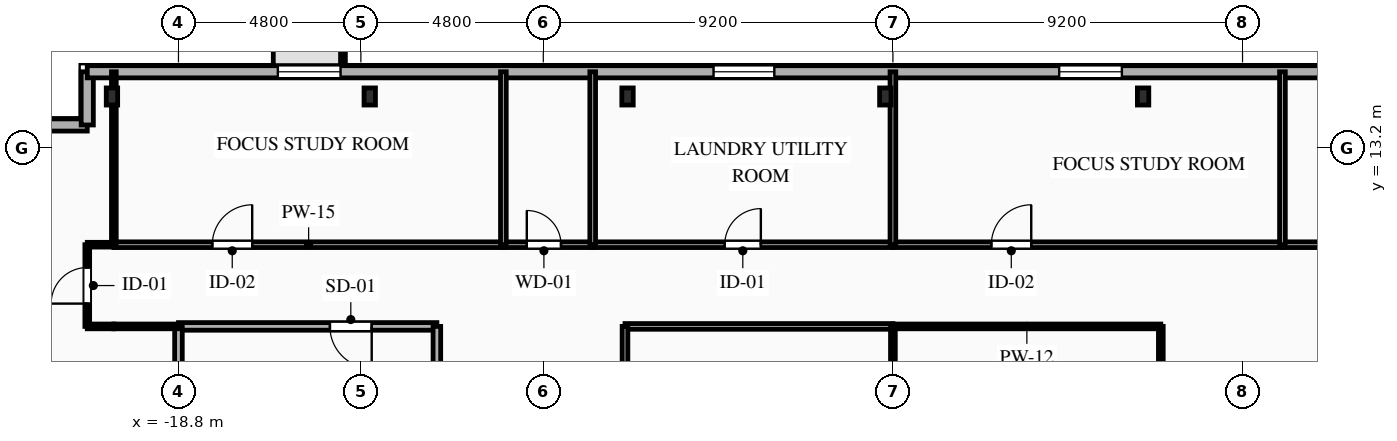
"""IFC4 building model, lengths in metres.
Left out: names, types, materials, properties, quantities, classifications, styles, units other than length and angle.
Written with IfcOpenShell. Run it as: python <this file> out.ifc"""

import sys

from ifc_helpers import new_model, si_unit, direction, frame, frame_2d, origin, origin_2d, place, context, subcontext, project, spatial, rectangle, i_section, extrude, element, fill, save


model = new_model("IFC4")
c1 = context("Model", 3, precision=1e-05, world=origin(), true_north=direction((0.0, 1.0)))
c2 = subcontext(c1, "Body", "Model", "MODEL_VIEW")
j1 = project(units=[si_unit("LENGTHUNIT", "METRE"), si_unit("PLANEANGLEUNIT", "RADIAN")], contexts=[c1])
p1 = place(None, origin())
s1 = spatial("IfcSite", under=j1, at=p1, CompositionType="ELEMENT")
p2 = place(p1, origin())
s2 = spatial("IfcBuilding", under=s1, at=p2, CompositionType="ELEMENT")
p3 = place(p2, frame((0.0, 0.0, 231.65)))
s3 = spatial("IfcBuildingStorey", under=s2, at=p3, CompositionType="ELEMENT", Elevation=231.65)
for number, where, z_axis, x_axis in (
    (1, (6.583, 14.55, 0.0), (0.0, 0.0, 1.0), (1.0, 0.0, 0.0)),
    (2, (-0.2, 14.55, 0.0), (0.0, 0.0, 1.0), (1.0, 0.0, 0.0)),
    (3, (-6.983, 14.55, 0.0), (0.0, 0.0, 1.0), (1.0, 0.0, 0.0)),
    (4, (-13.767, 14.55, 0.0), (0.0, 0.0, 1.0), (1.0, 0.0, 0.0)),
    (5, (-20.55, 14.55, 0.0), (0.0, 0.0, 1.0), (1.0, 0.0, 0.0)),
):
    element("IfcColumn", number, at=place(p3, frame(where, z_axis=z_axis, x_axis=x_axis)), inside=s3, PredefinedType="COLUMN", context=c2, shape_type="SweptSolid", body=[
        extrude(i_section(OverallWidth=0.3, OverallDepth=0.45, WebThickness=0.014, FlangeThickness=0.026, FilletRadius=0.027, at=origin_2d()), origin(), (0.0, 0.0, 1.0), 3.35),
    ])
p4 = place(p3, frame((-22.6, 13.8, 0.0), z_axis=(0.0, 0.0, 1.0), x_axis=(1.0, 0.0, 0.0)))
e6 = element("IfcWall", 6, at=p4, inside=s3, PredefinedType="SOLIDWALL", context=c2, shape_type="SweptSolid", body=[
    extrude(rectangle(XDim=1.4, YDim=0.32, at=frame_2d((0.7, 0.0))), origin(), (0.0, 0.0, 1.0), 3.04),
])
p5 = place(p3, frame((-21.2, 13.8, 0.0), z_axis=(0.0, 0.0, 1.0), x_axis=(0.0, 1.0, 0.0)))
e7 = element("IfcWall", 7, at=p5, inside=s3, PredefinedType="SOLIDWALL", context=c2, shape_type="SweptSolid", body=[
    extrude(rectangle(XDim=1.4, YDim=0.32, at=frame_2d((0.7, 0.0))), origin(), (0.0, 0.0, 1.0), 3.04),
])
p6 = place(p3, frame((-21.2, 15.2, 0.0), z_axis=(0.0, 0.0, 1.0), x_axis=(1.0, 0.0, 0.0)))
e8 = element("IfcWall", 8, at=p6, inside=s3, PredefinedType="SOLIDWALL", context=c2, shape_type="SweptSolid", body=[
    extrude(rectangle(XDim=42.0, YDim=0.32, at=frame_2d((21.0, 0.0))), origin(), (0.0, 0.0, 1.0), 3.04),
])
p7 = place(p6, frame((5.015, 0.0, 0.85)))
e9 = element("IfcOpeningElement", 9, at=p7, cuts=e8, PredefinedType="OPENING", context=c2, shape_type="SweptSolid", body=[
    extrude(rectangle(XDim=1.65, YDim=1.85, at=frame_2d((0.825, 0.925))), frame((0.0, 0.17, 0.0), z_axis=(0.0, -1.0, 0.0), x_axis=(1.0, 0.0, 0.0)), (0.0, 0.0, 1.0), 0.34),
])
p8 = place(p6, frame((16.48, 0.0, 0.85)))
e10 = element("IfcOpeningElement", 10, at=p8, cuts=e8, PredefinedType="OPENING", context=c2, shape_type="SweptSolid", body=[
    extrude(rectangle(XDim=1.6, YDim=1.85, at=frame_2d((0.8, 0.925))), frame((0.0, 0.17, 0.0), z_axis=(0.0, -1.0, 0.0), x_axis=(1.0, 0.0, 0.0)), (0.0, 0.0, 1.0), 0.34),
])
p9 = place(p6, frame((25.575, 0.0, 0.85)))
e11 = element("IfcOpeningElement", 11, at=p9, cuts=e8, PredefinedType="OPENING", context=c2, shape_type="SweptSolid", body=[
    extrude(rectangle(XDim=1.65, YDim=1.85, at=frame_2d((0.825, 0.925))), frame((0.0, 0.17, 0.0), z_axis=(0.0, -1.0, 0.0), x_axis=(1.0, 0.0, 0.0)), (0.0, 0.0, 1.0), 0.34),
])
p10 = place(p6, frame((35.735, 0.0, 0.85)))
e12 = element("IfcOpeningElement", 12, at=p10, cuts=e8, PredefinedType="OPENING", context=c2, shape_type="SweptSolid", body=[
    extrude(rectangle(XDim=1.65, YDim=1.85, at=frame_2d((0.825, 0.925))), frame((0.0, 0.17, 0.0), z_axis=(0.0, -1.0, 0.0), x_axis=(1.0, 0.0, 0.0)), (0.0, 0.0, 1.0), 0.34),
])
p11 = place(p3, frame((-12.0, 8.5, 0.0), z_axis=(0.0, 0.0, 1.0), x_axis=(-1.0, 0.0, 0.0)))
e13 = element("IfcWall", 13, at=p11, inside=s3, PredefinedType="PARTITIONING", context=c2, shape_type="SweptSolid", body=[
    extrude(rectangle(XDim=6.8, YDim=0.2, at=frame_2d((3.4, 0.0))), origin(), (0.0, 0.0, 1.0), 3.04),
])
p12 = place(p11, frame((1.715, 0.0, 0.0)))
e14 = element("IfcOpeningElement", 14, at=p12, cuts=e13, PredefinedType="OPENING", context=c2, shape_type="SweptSolid", body=[
    extrude(rectangle(XDim=1.1, YDim=2.15, at=frame_2d((0.55, 1.075))), frame((0.0, 0.11, 0.0), z_axis=(0.0, -1.0, 0.0), x_axis=(1.0, 0.0, 0.0)), (0.0, 0.0, 1.0), 0.22),
])
p13 = place(p3, frame((-12.0, 5.6, 0.0), z_axis=(0.0, 0.0, 1.0), x_axis=(0.0, 1.0, 0.0)))
e15 = element("IfcWall", 15, at=p13, inside=s3, PredefinedType="PARTITIONING", context=c2, shape_type="SweptSolid", body=[
    extrude(rectangle(XDim=2.9, YDim=0.2, at=frame_2d((1.45, 0.0))), origin(), (0.0, 0.0, 1.0), 3.04),
])
p14 = place(p3, frame((-18.8, 8.5, 0.0), z_axis=(0.0, 0.0, 1.0), x_axis=(0.0, -1.0, 0.0)))
e16 = element("IfcWall", 16, at=p14, inside=s3, PredefinedType="PARTITIONING", context=c2, shape_type="SweptSolid", body=[
    extrude(rectangle(XDim=2.9, YDim=0.2, at=frame_2d((1.45, 0.0))), origin(), (0.0, 0.0, 1.0), 2.665),
])
p15 = place(p3, frame((-21.2, 8.5, 0.0), z_axis=(0.0, 0.0, 1.0), x_axis=(0.0, 1.0, 0.0)))
e17 = element("IfcWall", 17, at=p15, inside=s3, PredefinedType="PARTITIONING", context=c2, shape_type="SweptSolid", body=[
    extrude(rectangle(XDim=2.15, YDim=0.125, at=frame_2d((1.075, 0.0))), origin(), (0.0, 0.0, 1.0), 2.695),
])
p16 = place(p15, frame((0.6, 0.0, 0.0)))
e18 = element("IfcOpeningElement", 18, at=p16, cuts=e17, PredefinedType="OPENING", context=c2, shape_type="SweptSolid", body=[
    extrude(rectangle(XDim=0.95, YDim=2.1, at=frame_2d((0.475, 1.05))), frame((0.0, 0.073, 0.0), z_axis=(0.0, -1.0, 0.0), x_axis=(1.0, 0.0, 0.0)), (0.0, 0.0, 1.0), 0.145),
])
p17 = place(p3, frame((-18.8, 8.5, 0.0), z_axis=(0.0, 0.0, 1.0), x_axis=(-1.0, 0.0, 0.0)))
e19 = element("IfcWall", 19, at=p17, inside=s3, PredefinedType="PARTITIONING", context=c2, shape_type="SweptSolid", body=[
    extrude(rectangle(XDim=1.7, YDim=0.125, at=frame_2d((0.85, 0.0))), origin(), (0.0, 0.0, 1.0), 3.04),
])
for number, where, z_axis, x_axis in (
    (20, (-20.5, 8.5, 0.0), (0.0, 0.0, 1.0), (-1.0, 0.0, 0.0)),
    (21, (-21.2, 10.65, 0.0), (0.0, 0.0, 1.0), (1.0, 0.0, 0.0)),
):
    element("IfcWall", number, at=place(p3, frame(where, z_axis=z_axis, x_axis=x_axis)), inside=s3, PredefinedType="PARTITIONING", context=c2, shape_type="SweptSolid", body=[
        extrude(rectangle(XDim=0.7, YDim=0.125, at=frame_2d((0.35, 0.0))), origin(), (0.0, 0.0, 1.0), 3.04),
    ])
p18 = place(p3, frame((-20.5, 10.65, 0.0), z_axis=(0.0, 0.0, 1.0), x_axis=(1.0, 0.0, 0.0)))
e22 = element("IfcWall", 22, at=p18, inside=s3, PredefinedType="PARTITIONING", context=c2, shape_type="SweptSolid", body=[
    extrude(rectangle(XDim=10.25, YDim=0.15, at=frame_2d((5.125, 0.0))), origin(), (0.0, 0.0, 1.0), 3.04),
])
p19 = place(p18, frame((2.59, 0.0, 0.0)))
e23 = element("IfcOpeningElement", 23, at=p19, cuts=e22, PredefinedType="OPENING", context=c2, shape_type="SweptSolid", body=[
    extrude(rectangle(XDim=1.05, YDim=2.15, at=frame_2d((0.525, 1.075))), frame((0.0, 0.085, 0.0), z_axis=(0.0, -1.0, 0.0), x_axis=(1.0, 0.0, 0.0)), (0.0, 0.0, 1.0), 0.17),
])
p20 = place(p3, frame((-10.25, 10.65, 0.0), z_axis=(0.0, 0.0, 1.0), x_axis=(1.0, 0.0, 0.0)))
e24 = element("IfcWall", 24, at=p20, inside=s3, PredefinedType="PLUMBINGWALL", context=c2, shape_type="SweptSolid", body=[
    extrude(rectangle(XDim=2.35, YDim=0.15, at=frame_2d((1.175, 0.0))), origin(), (0.0, 0.0, 1.0), 3.04),
])
p21 = place(p20, frame((0.616, 0.0, 0.0)))
e25 = element("IfcOpeningElement", 25, at=p21, cuts=e24, PredefinedType="OPENING", context=c2, shape_type="SweptSolid", body=[
    extrude(rectangle(XDim=0.9, YDim=2.1, at=frame_2d((0.45, 1.05))), frame((0.0, 0.085, 0.0), z_axis=(0.0, -1.0, 0.0), x_axis=(1.0, 0.0, 0.0)), (0.0, 0.0, 1.0), 0.17),
])
p22 = place(p3, frame((-7.9, 10.65, 0.0), z_axis=(0.0, 0.0, 1.0), x_axis=(1.0, 0.0, 0.0)))
e26 = element("IfcWall", 26, at=p22, inside=s3, PredefinedType="PARTITIONING", context=c2, shape_type="SweptSolid", body=[
    extrude(rectangle(XDim=7.9, YDim=0.15, at=frame_2d((3.95, 0.0))), origin(), (0.0, 0.0, 1.0), 3.04),
])
p23 = place(p22, frame((3.475, 0.0, 0.0)))
e27 = element("IfcOpeningElement", 27, at=p23, cuts=e26, PredefinedType="OPENING", context=c2, shape_type="SweptSolid", body=[
    extrude(rectangle(XDim=0.95, YDim=2.1, at=frame_2d((0.475, 1.05))), frame((0.0, 0.085, 0.0), z_axis=(0.0, -1.0, 0.0), x_axis=(1.0, 0.0, 0.0)), (0.0, 0.0, 1.0), 0.17),
])
p24 = place(p3, frame((0.0, 8.5, 0.0), z_axis=(0.0, 0.0, 1.0), x_axis=(-1.0, 0.0, 0.0)))
e28 = element("IfcWall", 28, at=p24, inside=s3, PredefinedType="PARTITIONING", context=c2, shape_type="SweptSolid", body=[
    extrude(rectangle(XDim=7.05, YDim=0.15, at=frame_2d((3.525, 0.0))), origin(), (0.0, 0.0, 1.0), 3.04),
])
p25 = place(p3, frame((0.0, 10.65, 0.0), z_axis=(0.0, 0.0, 1.0), x_axis=(1.0, 0.0, 0.0)))
e29 = element("IfcWall", 29, at=p25, inside=s3, PredefinedType="PARTITIONING", context=c2, shape_type="SweptSolid", body=[
    extrude(rectangle(XDim=10.25, YDim=0.15, at=frame_2d((5.125, 0.0))), origin(), (0.0, 0.0, 1.0), 3.04),
])
p26 = place(p25, frame((2.59, 0.0, 0.0)))
e30 = element("IfcOpeningElement", 30, at=p26, cuts=e29, PredefinedType="OPENING", context=c2, shape_type="SweptSolid", body=[
    extrude(rectangle(XDim=1.05, YDim=2.15, at=frame_2d((0.525, 1.075))), frame((0.0, 0.085, 0.0), z_axis=(0.0, -1.0, 0.0), x_axis=(1.0, 0.0, 0.0)), (0.0, 0.0, 1.0), 0.17),
])
p27 = place(p3, frame((10.25, 10.65, 0.0), z_axis=(0.0, 0.0, 1.0), x_axis=(1.0, 0.0, 0.0)))
e31 = element("IfcWall", 31, at=p27, inside=s3, PredefinedType="PARTITIONING", context=c2, shape_type="SweptSolid", body=[
    extrude(rectangle(XDim=10.25, YDim=0.15, at=frame_2d((5.125, 0.0))), origin(), (0.0, 0.0, 1.0), 3.04),
])
p28 = place(p27, frame((5.605, 0.0, 0.0)))
e32 = element("IfcOpeningElement", 32, at=p28, cuts=e31, PredefinedType="OPENING", context=c2, shape_type="SweptSolid", body=[
    extrude(rectangle(XDim=1.05, YDim=2.15, at=frame_2d((0.525, 1.075))), frame((0.0, 0.085, 0.0), z_axis=(0.0, -1.0, 0.0), x_axis=(1.0, 0.0, 0.0)), (0.0, 0.0, 1.0), 0.17),
])
p29 = place(p3, frame((7.05, 8.5, 0.0), z_axis=(0.0, 0.0, 1.0), x_axis=(-1.0, 0.0, 0.0)))
e33 = element("IfcWall", 33, at=p29, inside=s3, PredefinedType="PARTITIONING", context=c2, shape_type="SweptSolid", body=[
    extrude(rectangle(XDim=7.05, YDim=0.125, at=frame_2d((3.525, 0.0))), origin(), (0.0, 0.0, 1.0), 3.04),
])
p30 = place(p3, frame((-7.05, 8.5, 0.0), z_axis=(0.0, 0.0, 1.0), x_axis=(0.0, -1.0, 0.0)))
e34 = element("IfcWall", 34, at=p30, inside=s3, PredefinedType="PARTITIONING", context=c2, shape_type="SweptSolid", body=[
    extrude(rectangle(XDim=14.1, YDim=0.15, at=frame_2d((7.05, 0.0))), origin(), (0.0, 0.0, 1.0), 3.04),
])
p31 = place(p30, frame((8.074, 0.0, 0.0)))
e35 = element("IfcOpeningElement", 35, at=p31, cuts=e34, PredefinedType="OPENING", context=c2, shape_type="SweptSolid", body=[
    extrude(rectangle(XDim=0.95, YDim=2.1, at=frame_2d((0.475, 1.05))), frame((0.0, 0.085, 0.0), z_axis=(0.0, -1.0, 0.0), x_axis=(1.0, 0.0, 0.0)), (0.0, 0.0, 1.0), 0.17),
])
p32 = place(p3, frame((7.05, -5.6, 0.0), z_axis=(0.0, 0.0, 1.0), x_axis=(0.0, 1.0, 0.0)))
e36 = element("IfcWall", 36, at=p32, inside=s3, PredefinedType="PARTITIONING", context=c2, shape_type="SweptSolid", body=[
    extrude(rectangle(XDim=14.1, YDim=0.125, at=frame_2d((7.05, 0.0))), origin(), (0.0, 0.0, 1.0), 3.04),
])
p33 = place(p32, frame((5.076, 0.0, 0.0)))
e37 = element("IfcOpeningElement", 37, at=p33, cuts=e36, PredefinedType="OPENING", context=c2, shape_type="SweptSolid", body=[
    extrude(rectangle(XDim=0.95, YDim=2.1, at=frame_2d((0.475, 1.05))), frame((0.0, 0.073, 0.0), z_axis=(0.0, -1.0, 0.0), x_axis=(1.0, 0.0, 0.0)), (0.0, 0.0, 1.0), 0.145),
])
p34 = place(p3, frame((-20.5, 15.2, 0.0), z_axis=(0.0, 0.0, 1.0), x_axis=(0.0, -1.0, 0.0)))
e38 = element("IfcWall", 38, at=p34, inside=s3, PredefinedType="PARTITIONING", context=c2, shape_type="SweptSolid", body=[
    extrude(rectangle(XDim=4.55, YDim=0.125, at=frame_2d((2.275, 0.0))), origin(), (0.0, 0.0, 1.0), 2.665),
])
p35 = place(p3, frame((-10.25, 15.2, 0.0), z_axis=(0.0, 0.0, 1.0), x_axis=(0.0, -1.0, 0.0)))
e39 = element("IfcWall", 39, at=p35, inside=s3, PredefinedType="PLUMBINGWALL", context=c2, shape_type="SweptSolid", body=[
    extrude(rectangle(XDim=4.55, YDim=0.15, at=frame_2d((2.275, 0.0))), origin(), (0.0, 0.0, 1.0), 3.04),
])
p36 = place(p3, frame((-7.9, 15.2, 0.0), z_axis=(0.0, 0.0, 1.0), x_axis=(0.0, -1.0, 0.0)))
e40 = element("IfcWall", 40, at=p36, inside=s3, PredefinedType="PLUMBINGWALL", context=c2, shape_type="SweptSolid", body=[
    extrude(rectangle(XDim=4.55, YDim=0.15, at=frame_2d((2.275, 0.0))), origin(), (0.0, 0.0, 1.0), 2.665),
])
for number, where, z_axis, x_axis in (
    (41, (0.0, 15.2, 0.0), (0.0, 0.0, 1.0), (0.0, -1.0, 0.0)),
    (42, (10.25, 15.2, 0.0), (0.0, 0.0, 1.0), (0.0, -1.0, 0.0)),
):
    element("IfcWall", number, at=place(p3, frame(where, z_axis=z_axis, x_axis=x_axis)), inside=s3, PredefinedType="PARTITIONING", context=c2, shape_type="SweptSolid", body=[
        extrude(rectangle(XDim=4.55, YDim=0.15, at=frame_2d((2.275, 0.0))), origin(), (0.0, 0.0, 1.0), 3.04),
    ])
p37 = place(p3, frame((0.0, 8.5, 0.0), z_axis=(0.0, 0.0, 1.0), x_axis=(0.0, -1.0, 0.0)))
e43 = element("IfcWall", 43, at=p37, inside=s3, PredefinedType="PARTITIONING", context=c2, shape_type="SweptSolid", body=[
    extrude(rectangle(XDim=14.1, YDim=0.125, at=frame_2d((7.05, 0.0))), origin(), (0.0, 0.0, 1.0), 3.04),
])
p38 = place(p7, origin())
e44 = element("IfcWindow", 44, at=p38, inside=s3, PartitioningType="SINGLE_PANEL", PredefinedType="WINDOW", context=c2, shape_type="SweptSolid", body=[
    extrude(rectangle(XDim=1.65, YDim=1.85, at=frame_2d((0.825, 0.925))), frame((0.0, 0.03, 0.0), z_axis=(0.0, -1.0, 0.0), x_axis=(1.0, 0.0, 0.0)), (0.0, 0.0, 1.0), 0.06),
])
fill(e9, e44)
p39 = place(p8, origin())
e45 = element("IfcWindow", 45, at=p39, inside=s3, PartitioningType="SINGLE_PANEL", PredefinedType="WINDOW", context=c2, shape_type="SweptSolid", body=[
    extrude(rectangle(XDim=1.6, YDim=1.85, at=frame_2d((0.8, 0.925))), frame((0.0, 0.03, 0.0), z_axis=(0.0, -1.0, 0.0), x_axis=(1.0, 0.0, 0.0)), (0.0, 0.0, 1.0), 0.06),
])
fill(e10, e45)
p40 = place(p9, origin())
e46 = element("IfcWindow", 46, at=p40, inside=s3, PartitioningType="SINGLE_PANEL", PredefinedType="WINDOW", context=c2, shape_type="SweptSolid", body=[
    extrude(rectangle(XDim=1.65, YDim=1.85, at=frame_2d((0.825, 0.925))), frame((0.0, 0.03, 0.0), z_axis=(0.0, -1.0, 0.0), x_axis=(1.0, 0.0, 0.0)), (0.0, 0.0, 1.0), 0.06),
])
fill(e11, e46)
p41 = place(p12, origin())
e47 = element("IfcDoor", 47, at=p41, inside=s3, OperationType="SINGLE_SWING_LEFT", PredefinedType="DOOR", context=c2, shape_type="SweptSolid", body=[
    extrude(rectangle(XDim=1.1, YDim=2.15, at=frame_2d((0.55, 1.075))), frame((0.0, 0.025, 0.0), z_axis=(0.0, -1.0, 0.0), x_axis=(1.0, 0.0, 0.0)), (0.0, 0.0, 1.0), 0.05),
])
fill(e14, e47)
p42 = place(p16, origin())
e48 = element("IfcDoor", 48, at=p42, inside=s3, OperationType="SINGLE_SWING_LEFT", PredefinedType="DOOR", context=c2, shape_type="SweptSolid", body=[
    extrude(rectangle(XDim=0.95, YDim=2.1, at=frame_2d((0.475, 1.05))), frame((0.0, 0.025, 0.0), z_axis=(0.0, -1.0, 0.0), x_axis=(1.0, 0.0, 0.0)), (0.0, 0.0, 1.0), 0.05),
])
fill(e18, e48)
p43 = place(p19, origin())
e49 = element("IfcDoor", 49, at=p43, inside=s3, OperationType="SINGLE_SWING_RIGHT", PredefinedType="DOOR", context=c2, shape_type="SweptSolid", body=[
    extrude(rectangle(XDim=1.05, YDim=2.15, at=frame_2d((0.525, 1.075))), frame((0.0, 0.025, 0.0), z_axis=(0.0, -1.0, 0.0), x_axis=(1.0, 0.0, 0.0)), (0.0, 0.0, 1.0), 0.05),
])
fill(e23, e49)
p44 = place(p21, origin())
e50 = element("IfcDoor", 50, at=p44, inside=s3, OperationType="SINGLE_SWING_LEFT", PredefinedType="DOOR", context=c2, shape_type="SweptSolid", body=[
    extrude(rectangle(XDim=0.9, YDim=2.1, at=frame_2d((0.45, 1.05))), frame((0.0, 0.025, 0.0), z_axis=(0.0, -1.0, 0.0), x_axis=(1.0, 0.0, 0.0)), (0.0, 0.0, 1.0), 0.05),
])
fill(e25, e50)
p45 = place(p23, origin())
e51 = element("IfcDoor", 51, at=p45, inside=s3, OperationType="SINGLE_SWING_RIGHT", PredefinedType="DOOR", context=c2, shape_type="SweptSolid", body=[
    extrude(rectangle(XDim=0.95, YDim=2.1, at=frame_2d((0.475, 1.05))), frame((0.0, 0.025, 0.0), z_axis=(0.0, -1.0, 0.0), x_axis=(1.0, 0.0, 0.0)), (0.0, 0.0, 1.0), 0.05),
])
fill(e27, e51)
p46 = place(p26, origin())
e52 = element("IfcDoor", 52, at=p46, inside=s3, OperationType="SINGLE_SWING_RIGHT", PredefinedType="DOOR", context=c2, shape_type="SweptSolid", body=[
    extrude(rectangle(XDim=1.05, YDim=2.15, at=frame_2d((0.525, 1.075))), frame((0.0, 0.025, 0.0), z_axis=(0.0, -1.0, 0.0), x_axis=(1.0, 0.0, 0.0)), (0.0, 0.0, 1.0), 0.05),
])
fill(e30, e52)
save(model, sys.argv[1])
